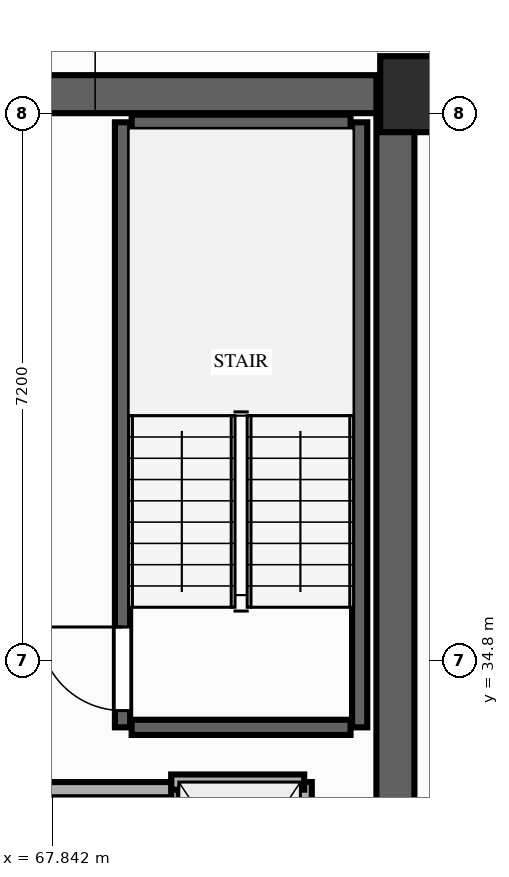
"""IFC4 building model, lengths in metres.
Left out: names, types, materials, properties, quantities, classifications, styles, units other than length and angle.
Written with IfcOpenShell. Run it as: python <this file> out.ifc"""

import sys

from ifc_helpers import new_model, si_unit, direction, frame, frame_2d, origin, origin_2d, place, context, subcontext, project, spatial, rectangle, extrude, element, fill, save


model = new_model("IFC4")
c1 = context("Model", 3, precision=1e-05, world=origin(), true_north=direction((0.0, 1.0)))
c2 = subcontext(c1, "Body", "Model", "MODEL_VIEW")
j1 = project(units=[si_unit("LENGTHUNIT", "METRE"), si_unit("PLANEANGLEUNIT", "RADIAN")], contexts=[c1])
p1 = place(None, origin())
s1 = spatial("IfcSite", under=j1, at=p1, CompositionType="ELEMENT")
p2 = place(p1, origin())
s2 = spatial("IfcBuilding", under=s1, at=p2, CompositionType="ELEMENT")
p3 = place(p2, frame((0.0, 0.0, 69.2)))
s3 = spatial("IfcBuildingStorey", under=s2, at=p3, CompositionType="ELEMENT", Elevation=69.2)
p4 = place(p3, frame((72.65, 42.25, 0.0), z_axis=(0.0, 0.0, 1.0), x_axis=(1.0, 0.0, 0.0)))
e1 = element("IfcColumn", 1, at=p4, inside=s3, PredefinedType="COLUMN", context=c2, shape_type="SweptSolid", body=[
    extrude(rectangle(XDim=1.0, YDim=1.0, at=origin_2d()), origin(), (0.0, 0.0, 1.0), 3.2),
])
p5 = place(p3, frame((72.35, 22.0, 0.0), z_axis=(0.0, 0.0, 1.0), x_axis=(0.0, 1.0, 0.0)))
e2 = element("IfcWall", 2, at=p5, inside=s3, PredefinedType="SHEAR", context=c2, shape_type="SweptSolid", body=[
    extrude(rectangle(XDim=20.25, YDim=0.5, at=frame_2d((10.125, 0.0))), origin(), (0.0, 0.0, 1.0), 3.02),
])
p6 = place(p3, frame((64.6, 42.25, 0.0), z_axis=(0.0, 0.0, 1.0), x_axis=(1.0, 0.0, 0.0)))
e3 = element("IfcWall", 3, at=p6, inside=s3, PredefinedType="SHEAR", context=c2, shape_type="SweptSolid", body=[
    extrude(rectangle(XDim=7.5, YDim=0.5, at=frame_2d((3.75, 0.0))), origin(), (0.0, 0.0, 1.0), 3.02),
])
p7 = place(p3, frame((68.76, 33.92, 0.0), z_axis=(0.0, 0.0, 1.0), x_axis=(0.0, 1.0, 0.0)))
e4 = element("IfcWall", 4, at=p7, inside=s3, PredefinedType="SHEAR", context=c2, shape_type="SweptSolid", body=[
    extrude(rectangle(XDim=7.96, YDim=0.2, at=frame_2d((3.98, 0.0))), origin(), (0.0, 0.0, 1.0), 3.02),
])
p8 = place(p7, frame((0.22, 0.0, 0.0)))
e5 = element("IfcOpeningElement", 5, at=p8, cuts=e4, PredefinedType="OPENING", context=c2, shape_type="SweptSolid", body=[
    extrude(rectangle(XDim=1.1, YDim=2.15, at=frame_2d((0.55, 1.075))), frame((0.0, 0.11, 0.0), z_axis=(0.0, -1.0, 0.0), x_axis=(1.0, 0.0, 0.0)), (0.0, 0.0, 1.0), 0.22),
])
p9 = place(p3, frame((71.88, 33.92, 0.0), z_axis=(0.0, 0.0, 1.0), x_axis=(0.0, 1.0, 0.0)))
e6 = element("IfcWall", 6, at=p9, inside=s3, PredefinedType="SHEAR", context=c2, shape_type="SweptSolid", body=[
    extrude(rectangle(XDim=7.96, YDim=0.2, at=frame_2d((3.98, 0.0))), origin(), (0.0, 0.0, 1.0), 3.02),
])
for number, where, z_axis, x_axis in (
    (7, (68.88, 41.88, 0.0), (0.0, 0.0, 1.0), (1.0, 0.0, 0.0)),
    (8, (68.88, 33.92, 0.0), (0.0, 0.0, 1.0), (1.0, 0.0, 0.0)),
):
    element("IfcWall", number, at=place(p3, frame(where, z_axis=z_axis, x_axis=x_axis)), inside=s3, PredefinedType="SHEAR", context=c2, shape_type="SweptSolid", body=[
        extrude(rectangle(XDim=2.88, YDim=0.2, at=frame_2d((1.44, 0.0))), origin(), (0.0, 0.0, 1.0), 3.02),
    ])
p10 = place(p3, frame((69.4, 30.75, 0.0), z_axis=(0.0, 0.0, 1.0), x_axis=(0.0, 1.0, 0.0)))
e9 = element("IfcWall", 9, at=p10, inside=s3, PredefinedType="MOVABLE", context=c2, shape_type="SweptSolid", body=[
    extrude(rectangle(XDim=2.45, YDim=0.2, at=frame_2d((1.225, 0.0))), origin(), (0.0, 0.0, 1.0), 3.02),
])
p11 = place(p10, frame((0.65, 0.0, 0.0)))
e10 = element("IfcOpeningElement", 10, at=p11, cuts=e9, PredefinedType="OPENING", context=c2, shape_type="SweptSolid", body=[
    extrude(rectangle(XDim=1.05, YDim=2.15, at=frame_2d((0.525, 1.075))), frame((0.0, 0.11, 0.0), z_axis=(0.0, -1.0, 0.0), x_axis=(1.0, 0.0, 0.0)), (0.0, 0.0, 1.0), 0.22),
])
p12 = place(p3, frame((71.15, 30.75, 0.0), z_axis=(0.0, 0.0, 1.0), x_axis=(0.0, 1.0, 0.0)))
e11 = element("IfcWall", 11, at=p12, inside=s3, PredefinedType="MOVABLE", context=c2, shape_type="SweptSolid", body=[
    extrude(rectangle(XDim=2.45, YDim=0.2, at=frame_2d((1.225, 0.0))), origin(), (0.0, 0.0, 1.0), 3.02),
])
p13 = place(p3, frame((69.4, 33.2, 0.0), z_axis=(0.0, 0.0, 1.0), x_axis=(1.0, 0.0, 0.0)))
e12 = element("IfcWall", 12, at=p13, inside=s3, PredefinedType="MOVABLE", context=c2, shape_type="SweptSolid", body=[
    extrude(rectangle(XDim=1.75, YDim=0.2, at=frame_2d((0.875, 0.0))), origin(), (0.0, 0.0, 1.0), 3.02),
])
p14 = place(p3, frame((65.8, 33.1, 0.0), z_axis=(0.0, 0.0, 1.0), x_axis=(1.0, 0.0, 0.0)))
e13 = element("IfcWall", 13, at=p14, inside=s3, PredefinedType="PARTITIONING", context=c2, shape_type="SweptSolid", body=[
    extrude(rectangle(XDim=3.6, YDim=0.2, at=frame_2d((1.8, 0.0))), origin(), (0.0, 0.0, 1.0), 3.02),
])
p15 = place(p8, origin())
e14 = element("IfcDoor", 14, at=p15, inside=s3, OperationType="SINGLE_SWING_RIGHT", PredefinedType="DOOR", context=c2, shape_type="SweptSolid", body=[
    extrude(rectangle(XDim=1.1, YDim=2.15, at=frame_2d((0.55, 1.075))), frame((0.0, 0.025, 0.0), z_axis=(0.0, -1.0, 0.0), x_axis=(1.0, 0.0, 0.0)), (0.0, 0.0, 1.0), 0.05),
])
fill(e5, e14)
save(model, sys.argv[1])
